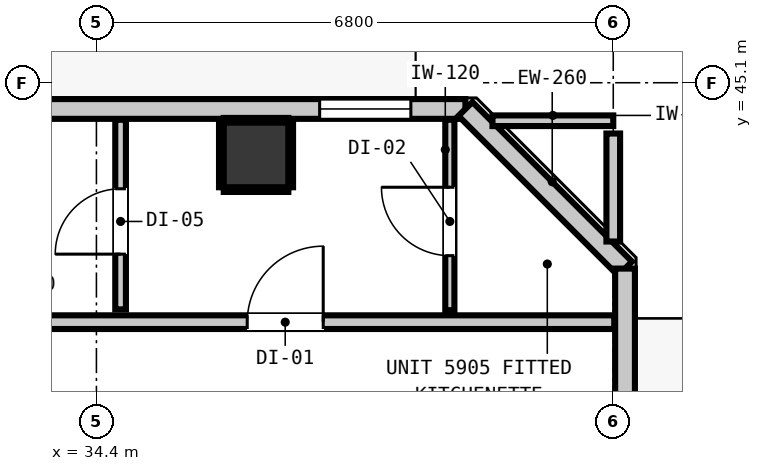
"""IFC4 building model, lengths in metres.
Left out: names, types, materials, properties, quantities, classifications, styles, units other than length and angle.
Written with IfcOpenShell. Run it as: python <this file> out.ifc"""

import sys

from ifc_helpers import new_model, si_unit, direction, frame, frame_2d, origin, origin_2d, place, context, subcontext, project, spatial, rectangle, extrude, element, fill, save


model = new_model("IFC4")
c1 = context("Model", 3, precision=1e-05, world=origin(), true_north=direction((0.0, 1.0)))
c2 = subcontext(c1, "Body", "Model", "MODEL_VIEW")
j1 = project(units=[si_unit("LENGTHUNIT", "METRE"), si_unit("PLANEANGLEUNIT", "RADIAN")], contexts=[c1])
p1 = place(None, origin())
s1 = spatial("IfcSite", under=j1, at=p1, CompositionType="ELEMENT")
p2 = place(p1, origin())
s2 = spatial("IfcBuilding", under=s1, at=p2, CompositionType="ELEMENT")
p3 = place(p2, frame((0.0, 0.0, 203.44)))
s3 = spatial("IfcBuildingStorey", under=s2, at=p3, CompositionType="ELEMENT", Elevation=203.44)
p4 = place(p3, frame((36.5, 44.15, 0.0), z_axis=(0.0, 0.0, 1.0), x_axis=(1.0, 0.0, 0.0)))
e1 = element("IfcColumn", 1, at=p4, inside=s3, PredefinedType="COLUMN", context=c2, shape_type="SweptSolid", body=[
    extrude(rectangle(XDim=0.85, YDim=0.85, at=origin_2d()), origin(), (0.0, 0.0, 1.0), 3.32),
])
p5 = place(p3, frame((6.545, 44.755, 0.0), z_axis=(0.0, 0.0, 1.0), x_axis=(1.0, 0.0, 0.0)))
e2 = element("IfcWall", 2, at=p5, inside=s3, PredefinedType="STANDARD", context=c2, shape_type="SweptSolid", body=[
    extrude(rectangle(XDim=32.71, YDim=0.26, at=frame_2d((16.355, 0.0))), origin(), (0.0, 0.0, 1.0), 3.1),
])
p6 = place(p5, frame((0.907, 0.0, 0.0)))
e3 = element("IfcOpeningElement", 3, at=p6, cuts=e2, PredefinedType="OPENING", context=c2, shape_type="SweptSolid", body=[
    extrude(rectangle(XDim=1.0, YDim=2.15, at=frame_2d((0.5, 1.075))), frame((0.0, 0.14, 0.0), z_axis=(0.0, -1.0, 0.0), x_axis=(1.0, 0.0, 0.0)), (0.0, 0.0, 1.0), 0.28),
])
p7 = place(p5, frame((9.955, 0.0, 0.85)))
e4 = element("IfcOpeningElement", 4, at=p7, cuts=e2, PredefinedType="OPENING", context=c2, shape_type="SweptSolid", body=[
    extrude(rectangle(XDim=1.2, YDim=1.8, at=frame_2d((0.6, 0.9))), frame((0.0, 0.14, 0.0), z_axis=(0.0, -1.0, 0.0), x_axis=(1.0, 0.0, 0.0)), (0.0, 0.0, 1.0), 0.28),
])
p8 = place(p5, frame((19.641, 0.0, 0.85)))
e5 = element("IfcOpeningElement", 5, at=p8, cuts=e2, PredefinedType="OPENING", context=c2, shape_type="SweptSolid", body=[
    extrude(rectangle(XDim=1.2, YDim=1.8, at=frame_2d((0.6, 0.9))), frame((0.0, 0.14, 0.0), z_axis=(0.0, -1.0, 0.0), x_axis=(1.0, 0.0, 0.0)), (0.0, 0.0, 1.0), 0.28),
])
p9 = place(p5, frame((30.792, 0.0, 0.85)))
e6 = element("IfcOpeningElement", 6, at=p9, cuts=e2, PredefinedType="OPENING", context=c2, shape_type="SweptSolid", body=[
    extrude(rectangle(XDim=1.2, YDim=1.8, at=frame_2d((0.6, 0.9))), frame((0.0, 0.14, 0.0), z_axis=(0.0, -1.0, 0.0), x_axis=(1.0, 0.0, 0.0)), (0.0, 0.0, 1.0), 0.28),
])
p10 = place(p3, frame((39.255, 44.755, 0.0), z_axis=(0.0, 0.0, 1.0), x_axis=(0.707147883682, -0.707065676302, 0.0)))
e7 = element("IfcWall", 7, at=p10, inside=s3, PredefinedType="STANDARD", context=c2, shape_type="SweptSolid", body=[
    extrude(rectangle(XDim=2.97, YDim=0.26, at=frame_2d((1.485, 0.0))), origin(), (0.0, 0.0, 1.0), 3.1),
])
p11 = place(p3, frame((41.355, 42.655, 0.0), z_axis=(0.0, 0.0, 1.0), x_axis=(0.0, -1.0, 0.0)))
e8 = element("IfcWall", 8, at=p11, inside=s3, PredefinedType="STANDARD", context=c2, shape_type="SweptSolid", body=[
    extrude(rectangle(XDim=30.31, YDim=0.26, at=frame_2d((15.155, 0.0))), origin(), (0.0, 0.0, 1.0), 3.1),
])
p12 = place(p11, frame((23.818, 0.0, 0.0)))
e9 = element("IfcOpeningElement", 9, at=p12, cuts=e8, PredefinedType="OPENING", context=c2, shape_type="SweptSolid", body=[
    extrude(rectangle(XDim=1.0, YDim=2.15, at=frame_2d((0.5, 1.075))), frame((0.0, 0.14, 0.0), z_axis=(0.0, -1.0, 0.0), x_axis=(1.0, 0.0, 0.0)), (0.0, 0.0, 1.0), 0.28),
])
p13 = place(p11, frame((27.019, 0.0, 0.85)))
e10 = element("IfcOpeningElement", 10, at=p13, cuts=e8, PredefinedType="OPENING", context=c2, shape_type="SweptSolid", body=[
    extrude(rectangle(XDim=1.2, YDim=1.8, at=frame_2d((0.6, 0.9))), frame((0.0, 0.14, 0.0), z_axis=(0.0, -1.0, 0.0), x_axis=(1.0, 0.0, 0.0)), (0.0, 0.0, 1.0), 0.28),
])
p14 = place(p3, frame((13.012, 41.95, 0.0), z_axis=(0.0, 0.0, 1.0), x_axis=(1.0, 0.0, 0.0)))
e11 = element("IfcWall", 11, at=p14, inside=s3, PredefinedType="PARTITIONING", context=c2, shape_type="SweptSolid", body=[
    extrude(rectangle(XDim=28.201, YDim=0.18, at=frame_2d((14.101, 0.0))), origin(), (0.0, 0.0, 1.0), 3.1),
])
p15 = place(p14, frame((3.588, 0.0, 0.0)))
e12 = element("IfcOpeningElement", 12, at=p15, cuts=e11, PredefinedType="OPENING", context=c2, shape_type="SweptSolid", body=[
    extrude(rectangle(XDim=1.0, YDim=2.15, at=frame_2d((0.5, 1.075))), frame((0.0, 0.1, 0.0), z_axis=(0.0, -1.0, 0.0), x_axis=(1.0, 0.0, 0.0)), (0.0, 0.0, 1.0), 0.2),
])
p16 = place(p14, frame((14.227, 0.0, 0.0)))
e13 = element("IfcOpeningElement", 13, at=p16, cuts=e11, PredefinedType="OPENING", context=c2, shape_type="SweptSolid", body=[
    extrude(rectangle(XDim=1.0, YDim=2.15, at=frame_2d((0.5, 1.075))), frame((0.0, 0.1, 0.0), z_axis=(0.0, -1.0, 0.0), x_axis=(1.0, 0.0, 0.0)), (0.0, 0.0, 1.0), 0.2),
])
p17 = place(p14, frame((23.372, 0.0, 0.0)))
e14 = element("IfcOpeningElement", 14, at=p17, cuts=e11, PredefinedType="OPENING", context=c2, shape_type="SweptSolid", body=[
    extrude(rectangle(XDim=1.0, YDim=2.15, at=frame_2d((0.5, 1.075))), frame((0.0, 0.1, 0.0), z_axis=(0.0, -1.0, 0.0), x_axis=(1.0, 0.0, 0.0)), (0.0, 0.0, 1.0), 0.2),
])
p18 = place(p3, frame((39.611, 44.6, 0.0), z_axis=(0.0, 0.0, 1.0), x_axis=(1.0, 0.0, 0.0)))
e15 = element("IfcWall", 15, at=p18, inside=s3, PredefinedType="PARTITIONING", context=c2, shape_type="SweptSolid", body=[
    extrude(rectangle(XDim=1.589, YDim=0.14, at=frame_2d((0.794, 0.0))), origin(), (0.0, 0.0, 1.0), 3.1),
])
p19 = place(p3, frame((41.2, 43.011, 0.0), z_axis=(0.0, 0.0, 1.0), x_axis=(0.0, 1.0, 0.0)))
e16 = element("IfcWall", 16, at=p19, inside=s3, PredefinedType="PARTITIONING", context=c2, shape_type="SweptSolid", body=[
    extrude(rectangle(XDim=1.421, YDim=0.18, at=frame_2d((0.71, 0.0))), origin(), (0.0, 0.0, 1.0), 3.1),
])
p20 = place(p3, frame((34.718, 42.118, 0.0), z_axis=(0.0, 0.0, 1.0), x_axis=(0.0, 1.0, 0.0)))
e17 = element("IfcWall", 17, at=p20, inside=s3, PredefinedType="PARTITIONING", context=c2, shape_type="SweptSolid", body=[
    extrude(rectangle(XDim=2.495, YDim=0.14, at=frame_2d((1.248, 0.0))), origin(), (0.0, 0.0, 1.0), 3.1),
])
p21 = place(p20, frame((0.727, 0.0, 0.0)))
e18 = element("IfcOpeningElement", 18, at=p21, cuts=e17, PredefinedType="OPENING", context=c2, shape_type="SweptSolid", body=[
    extrude(rectangle(XDim=0.86, YDim=2.02, at=frame_2d((0.43, 1.01))), frame((0.0, 0.08, 0.0), z_axis=(0.0, -1.0, 0.0), x_axis=(1.0, 0.0, 0.0)), (0.0, 0.0, 1.0), 0.16),
])
p22 = place(p3, frame((39.05, 42.108, 0.0), z_axis=(0.0, 0.0, 1.0), x_axis=(0.0, 1.0, 0.0)))
e19 = element("IfcWall", 19, at=p22, inside=s3, PredefinedType="PARTITIONING", context=c2, shape_type="SweptSolid", body=[
    extrude(rectangle(XDim=2.505, YDim=0.12, at=frame_2d((1.252, 0.0))), origin(), (0.0, 0.0, 1.0), 3.1),
])
p23 = place(p22, frame((0.717, 0.0, 0.0)))
e20 = element("IfcOpeningElement", 20, at=p23, cuts=e19, PredefinedType="OPENING", context=c2, shape_type="SweptSolid", body=[
    extrude(rectangle(XDim=0.9, YDim=2.1, at=frame_2d((0.45, 1.05))), frame((0.0, 0.07, 0.0), z_axis=(0.0, -1.0, 0.0), x_axis=(1.0, 0.0, 0.0)), (0.0, 0.0, 1.0), 0.14),
])
for number, where, z_axis, x_axis in (
    (21, (36.075, 43.693, 0.0), (0.0, 0.0, 1.0), (1.0, 0.0, 0.0)),
    (22, (36.075, 44.607, 0.0), (0.0, 0.0, 1.0), (1.0, 0.0, 0.0)),
):
    element("IfcWall", number, at=place(p3, frame(where, z_axis=z_axis, x_axis=x_axis)), inside=s3, PredefinedType="PARTITIONING", context=c2, shape_type="SweptSolid", body=[
        extrude(rectangle(XDim=0.85, YDim=0.06, at=frame_2d((0.425, 0.0))), origin(), (0.0, 0.0, 1.0), 1.45),
    ])
for number, where, z_axis, x_axis in (
    (23, (36.043, 43.725, 0.0), (0.0, 0.0, 1.0), (0.0, 1.0, 0.0)),
    (24, (36.957, 43.725, 0.0), (0.0, 0.0, 1.0), (0.0, 1.0, 0.0)),
):
    element("IfcWall", number, at=place(p3, frame(where, z_axis=z_axis, x_axis=x_axis)), inside=s3, PredefinedType="PARTITIONING", context=c2, shape_type="SweptSolid", body=[
        extrude(rectangle(XDim=0.85, YDim=0.06, at=frame_2d((0.425, 0.0))), origin(), (0.0, 0.0, 1.0), 1.45),
    ])
p24 = place(p9, origin())
e25 = element("IfcWindow", 25, at=p24, inside=s3, PartitioningType="SINGLE_PANEL", PredefinedType="WINDOW", context=c2, shape_type="SweptSolid", body=[
    extrude(rectangle(XDim=1.2, YDim=1.8, at=frame_2d((0.6, 0.9))), frame((0.0, 0.03, 0.0), z_axis=(0.0, -1.0, 0.0), x_axis=(1.0, 0.0, 0.0)), (0.0, 0.0, 1.0), 0.06),
])
fill(e6, e25)
p25 = place(p17, origin())
e26 = element("IfcDoor", 26, at=p25, inside=s3, OperationType="SINGLE_SWING_RIGHT", PredefinedType="DOOR", context=c2, shape_type="SweptSolid", body=[
    extrude(rectangle(XDim=1.0, YDim=2.15, at=frame_2d((0.5, 1.075))), frame((0.0, 0.025, 0.0), z_axis=(0.0, -1.0, 0.0), x_axis=(1.0, 0.0, 0.0)), (0.0, 0.0, 1.0), 0.05),
])
fill(e14, e26)
p26 = place(p21, origin())
e27 = element("IfcDoor", 27, at=p26, inside=s3, OperationType="SINGLE_SWING_LEFT", PredefinedType="DOOR", context=c2, shape_type="SweptSolid", body=[
    extrude(rectangle(XDim=0.86, YDim=2.02, at=frame_2d((0.43, 1.01))), frame((0.0, 0.025, 0.0), z_axis=(0.0, -1.0, 0.0), x_axis=(1.0, 0.0, 0.0)), (0.0, 0.0, 1.0), 0.05),
])
fill(e18, e27)
p27 = place(p23, origin())
e28 = element("IfcDoor", 28, at=p27, inside=s3, OperationType="SINGLE_SWING_RIGHT", PredefinedType="DOOR", context=c2, shape_type="SweptSolid", body=[
    extrude(rectangle(XDim=0.9, YDim=2.1, at=frame_2d((0.45, 1.05))), frame((0.0, 0.025, 0.0), z_axis=(0.0, -1.0, 0.0), x_axis=(1.0, 0.0, 0.0)), (0.0, 0.0, 1.0), 0.05),
])
fill(e20, e28)
save(model, sys.argv[1])
